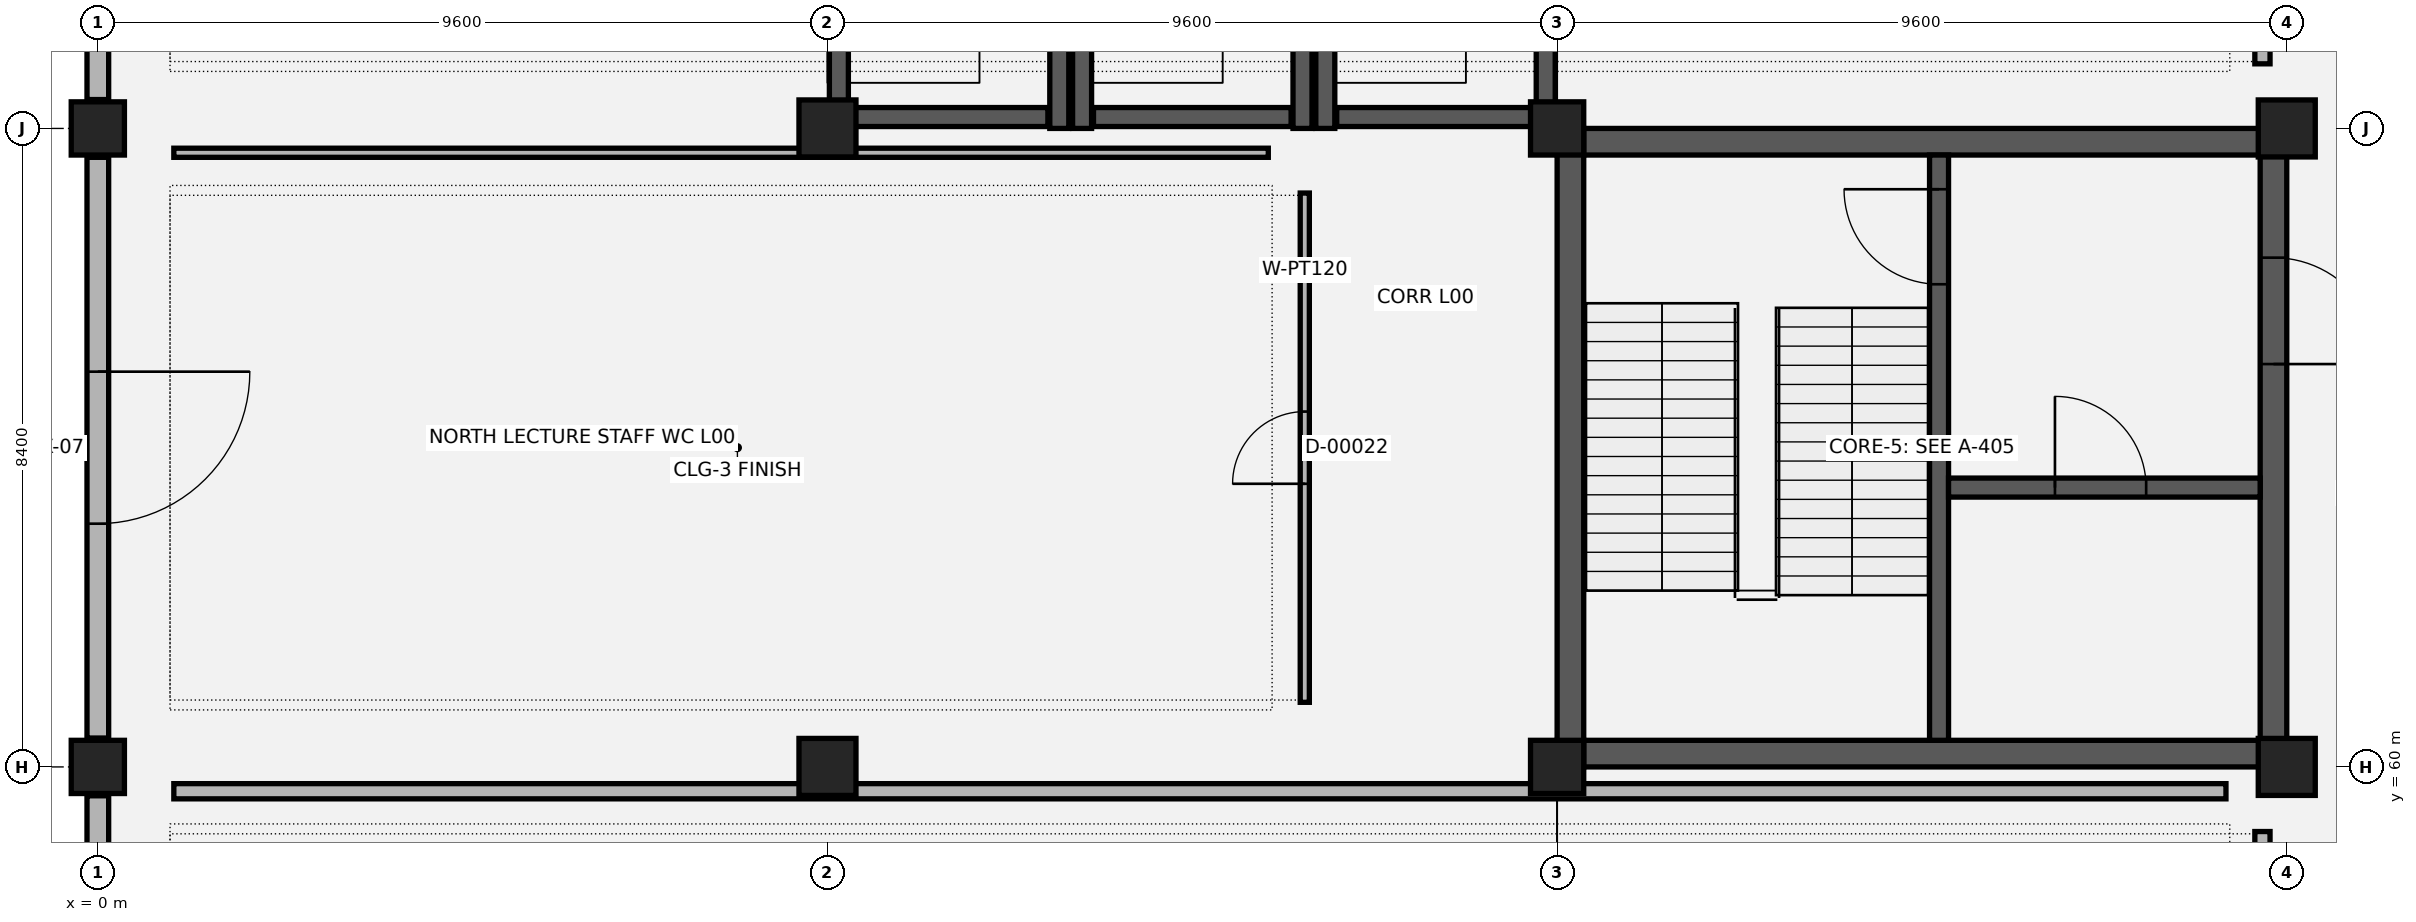
"""IFC4 building model, lengths in metres.
Left out: names, types, materials, properties, quantities, classifications, styles, units other than length and angle.
Written with IfcOpenShell. Run it as: python <this file> out.ifc"""

import sys

from ifc_helpers import new_model, si_unit, direction, frame, frame_2d, origin, origin_2d, place, context, subcontext, project, spatial, rectangle, extrude, element, fill, save


model = new_model("IFC4")
c1 = context("Model", 3, precision=1e-05, world=origin(), true_north=direction((0.0, 1.0)))
c2 = subcontext(c1, "Body", "Model", "MODEL_VIEW")
j1 = project(units=[si_unit("LENGTHUNIT", "METRE"), si_unit("PLANEANGLEUNIT", "RADIAN")], contexts=[c1])
p1 = place(None, origin())
s1 = spatial("IfcSite", under=j1, at=p1, CompositionType="ELEMENT")
p2 = place(p1, origin())
s2 = spatial("IfcBuilding", under=s1, at=p2, CompositionType="ELEMENT")
p3 = place(p2, origin())
s3 = spatial("IfcBuildingStorey", under=s2, at=p3, CompositionType="ELEMENT", Elevation=0.0)
for number, where, z_axis, x_axis in (
    (1, (0.0, 60.0, 0.0), (0.0, 0.0, 1.0), (1.0, 0.0, 0.0)),
    (2, (0.0, 68.4, 0.0), (0.0, 0.0, 1.0), (1.0, 0.0, 0.0)),
):
    element("IfcColumn", number, at=place(p3, frame(where, z_axis=z_axis, x_axis=x_axis)), inside=s3, PredefinedType="COLUMN", context=c2, shape_type="SweptSolid", body=[
        extrude(rectangle(XDim=0.7, YDim=0.7, at=origin_2d()), origin(), (0.0, 0.0, 1.0), 5.4),
    ])
for number, where, z_axis, x_axis in (
    (3, (9.6, 60.0, 0.0), (0.0, 0.0, 1.0), (1.0, 0.0, 0.0)),
    (4, (9.6, 68.4, 0.0), (0.0, 0.0, 1.0), (1.0, 0.0, 0.0)),
):
    element("IfcColumn", number, at=place(p3, frame(where, z_axis=z_axis, x_axis=x_axis)), inside=s3, PredefinedType="COLUMN", context=c2, shape_type="SweptSolid", body=[
        extrude(rectangle(XDim=0.75, YDim=0.75, at=origin_2d()), origin(), (0.0, 0.0, 1.0), 5.4),
    ])
for number, where, z_axis, x_axis in (
    (5, (19.2, 60.0, 0.0), (0.0, 0.0, 1.0), (1.0, 0.0, 0.0)),
    (6, (19.2, 68.4, 0.0), (0.0, 0.0, 1.0), (1.0, 0.0, 0.0)),
):
    element("IfcColumn", number, at=place(p3, frame(where, z_axis=z_axis, x_axis=x_axis)), inside=s3, PredefinedType="COLUMN", context=c2, shape_type="SweptSolid", body=[
        extrude(rectangle(XDim=0.7, YDim=0.7, at=origin_2d()), origin(), (0.0, 0.0, 1.0), 5.4),
    ])
for number, where, z_axis, x_axis in (
    (7, (28.8, 60.0, 0.0), (0.0, 0.0, 1.0), (1.0, 0.0, 0.0)),
    (8, (28.8, 68.4, 0.0), (0.0, 0.0, 1.0), (1.0, 0.0, 0.0)),
):
    element("IfcColumn", number, at=place(p3, frame(where, z_axis=z_axis, x_axis=x_axis)), inside=s3, PredefinedType="COLUMN", context=c2, shape_type="SweptSolid", body=[
        extrude(rectangle(XDim=0.75, YDim=0.75, at=origin_2d()), origin(), (0.0, 0.0, 1.0), 5.4),
    ])
for number, where, z_axis, x_axis in (
    (9, (9.75, 68.4, 0.0), (0.0, 0.0, 1.0), (0.0, 1.0, 0.0)),
    (10, (12.65, 68.4, 0.0), (0.0, 0.0, 1.0), (0.0, 1.0, 0.0)),
):
    element("IfcWall", number, at=place(p3, frame(where, z_axis=z_axis, x_axis=x_axis)), inside=s3, PredefinedType="SHEAR", context=c2, shape_type="SweptSolid", body=[
        extrude(rectangle(XDim=8.4, YDim=0.25, at=frame_2d((4.2, 0.0))), origin(), (0.0, 0.0, 1.0), 0.4),
    ])
p4 = place(p3, frame((9.9, 68.55, 0.0), z_axis=(0.0, 0.0, 1.0), x_axis=(1.0, 0.0, 0.0)))
e11 = element("IfcWall", 11, at=p4, inside=s3, PredefinedType="SHEAR", context=c2, shape_type="SweptSolid", body=[
    extrude(rectangle(XDim=2.6, YDim=0.25, at=frame_2d((1.3, 0.0))), origin(), (0.0, 0.0, 1.0), 0.4),
])
for number, where, z_axis, x_axis in (
    (12, (12.95, 68.4, 0.0), (0.0, 0.0, 1.0), (0.0, 1.0, 0.0)),
    (13, (15.85, 68.4, 0.0), (0.0, 0.0, 1.0), (0.0, 1.0, 0.0)),
):
    element("IfcWall", number, at=place(p3, frame(where, z_axis=z_axis, x_axis=x_axis)), inside=s3, PredefinedType="SHEAR", context=c2, shape_type="SweptSolid", body=[
        extrude(rectangle(XDim=8.4, YDim=0.25, at=frame_2d((4.2, 0.0))), origin(), (0.0, 0.0, 1.0), 1.0),
    ])
p5 = place(p3, frame((13.1, 68.55, 0.0), z_axis=(0.0, 0.0, 1.0), x_axis=(1.0, 0.0, 0.0)))
e14 = element("IfcWall", 14, at=p5, inside=s3, PredefinedType="SHEAR", context=c2, shape_type="SweptSolid", body=[
    extrude(rectangle(XDim=2.6, YDim=0.25, at=frame_2d((1.3, 0.0))), origin(), (0.0, 0.0, 1.0), 1.0),
])
for number, where, z_axis, x_axis in (
    (15, (16.15, 68.4, 0.0), (0.0, 0.0, 1.0), (0.0, 1.0, 0.0)),
    (16, (19.05, 68.4, 0.0), (0.0, 0.0, 1.0), (0.0, 1.0, 0.0)),
):
    element("IfcWall", number, at=place(p3, frame(where, z_axis=z_axis, x_axis=x_axis)), inside=s3, PredefinedType="SHEAR", context=c2, shape_type="SweptSolid", body=[
        extrude(rectangle(XDim=8.4, YDim=0.25, at=frame_2d((4.2, 0.0))), origin(), (0.0, 0.0, 1.0), 1.6),
    ])
p6 = place(p3, frame((16.3, 68.55, 0.0), z_axis=(0.0, 0.0, 1.0), x_axis=(1.0, 0.0, 0.0)))
e17 = element("IfcWall", 17, at=p6, inside=s3, PredefinedType="SHEAR", context=c2, shape_type="SweptSolid", body=[
    extrude(rectangle(XDim=2.6, YDim=0.25, at=frame_2d((1.3, 0.0))), origin(), (0.0, 0.0, 1.0), 1.6),
])
p7 = place(p3, frame((0.0, 59.62, 0.0), z_axis=(0.0, 0.0, 1.0), x_axis=(0.0, -1.0, 0.0)))
e18 = element("IfcWall", 18, at=p7, inside=s3, PredefinedType="SOLIDWALL", context=c2, shape_type="SweptSolid", body=[
    extrude(rectangle(XDim=7.64, YDim=0.285, at=frame_2d((3.82, 0.0))), origin(), (0.0, 0.0, 1.0), 4.04),
])
p8 = place(p7, frame((1.06, 0.0, 0.9)))
e19 = element("IfcOpeningElement", 19, at=p8, cuts=e18, PredefinedType="OPENING", context=c2, shape_type="SweptSolid", body=[
    extrude(rectangle(XDim=1.7, YDim=1.45, at=frame_2d((0.85, 0.725))), frame((0.0, 0.152, 0.0), z_axis=(0.0, -1.0, 0.0), x_axis=(1.0, 0.0, 0.0)), (0.0, 0.0, 1.0), 0.305),
])
p9 = place(p7, frame((5.005, 0.0, 0.9)))
e20 = element("IfcOpeningElement", 20, at=p9, cuts=e18, PredefinedType="OPENING", context=c2, shape_type="SweptSolid", body=[
    extrude(rectangle(XDim=1.45, YDim=1.45, at=frame_2d((0.725, 0.725))), frame((0.0, 0.152, 0.0), z_axis=(0.0, -1.0, 0.0), x_axis=(1.0, 0.0, 0.0)), (0.0, 0.0, 1.0), 0.305),
])
p10 = place(p3, frame((0.0, 68.02, 0.0), z_axis=(0.0, 0.0, 1.0), x_axis=(0.0, -1.0, 0.0)))
e21 = element("IfcWall", 21, at=p10, inside=s3, PredefinedType="SOLIDWALL", context=c2, shape_type="SweptSolid", body=[
    extrude(rectangle(XDim=7.64, YDim=0.285, at=frame_2d((3.82, 0.0))), origin(), (0.0, 0.0, 1.0), 4.04),
])
p11 = place(p10, frame((2.82, 0.0, 0.0)))
e22 = element("IfcOpeningElement", 22, at=p11, cuts=e21, PredefinedType="OPENING", context=c2, shape_type="SweptSolid", body=[
    extrude(rectangle(XDim=2.0, YDim=2.2, at=frame_2d((1.0, 1.1))), frame((0.0, 0.152, 0.0), z_axis=(0.0, -1.0, 0.0), x_axis=(1.0, 0.0, 0.0)), (0.0, 0.0, 1.0), 0.305),
])
p12 = place(p3, frame((0.0, 76.42, 0.0), z_axis=(0.0, 0.0, 1.0), x_axis=(0.0, -1.0, 0.0)))
e23 = element("IfcWall", 23, at=p12, inside=s3, PredefinedType="SOLIDWALL", context=c2, shape_type="SweptSolid", body=[
    extrude(rectangle(XDim=7.64, YDim=0.285, at=frame_2d((3.82, 0.0))), origin(), (0.0, 0.0, 1.0), 4.04),
])
p13 = place(p12, frame((1.26, 0.0, 0.9)))
e24 = element("IfcOpeningElement", 24, at=p13, cuts=e23, PredefinedType="OPENING", context=c2, shape_type="SweptSolid", body=[
    extrude(rectangle(XDim=1.3, YDim=1.4, at=frame_2d((0.65, 0.7))), frame((0.0, 0.152, 0.0), z_axis=(0.0, -1.0, 0.0), x_axis=(1.0, 0.0, 0.0)), (0.0, 0.0, 1.0), 0.305),
])
p14 = place(p12, frame((4.705, 0.0, 0.9)))
e25 = element("IfcOpeningElement", 25, at=p14, cuts=e23, PredefinedType="OPENING", context=c2, shape_type="SweptSolid", body=[
    extrude(rectangle(XDim=2.05, YDim=1.6, at=frame_2d((1.025, 0.8))), frame((0.0, 0.152, 0.0), z_axis=(0.0, -1.0, 0.0), x_axis=(1.0, 0.0, 0.0)), (0.0, 0.0, 1.0), 0.305),
])
for number, where, z_axis, x_axis in (
    (26, (19.2, 68.225, 0.0), (0.0, 0.0, 1.0), (1.0, 0.0, 0.0)),
    (27, (19.2, 60.175, 0.0), (0.0, 0.0, 1.0), (1.0, 0.0, 0.0)),
):
    element("IfcWall", number, at=place(p3, frame(where, z_axis=z_axis, x_axis=x_axis)), inside=s3, PredefinedType="SHEAR", context=c2, shape_type="SweptSolid", body=[
        extrude(rectangle(XDim=9.6, YDim=0.35, at=frame_2d((4.8, 0.0))), origin(), (0.0, 0.0, 1.0), 5.11),
    ])
p15 = place(p3, frame((19.375, 60.0, 0.0), z_axis=(0.0, 0.0, 1.0), x_axis=(0.0, 1.0, 0.0)))
e28 = element("IfcWall", 28, at=p15, inside=s3, PredefinedType="SHEAR", context=c2, shape_type="SweptSolid", body=[
    extrude(rectangle(XDim=8.4, YDim=0.35, at=frame_2d((4.2, 0.0))), origin(), (0.0, 0.0, 1.0), 5.11),
])
p16 = place(p3, frame((28.625, 60.0, 0.0), z_axis=(0.0, 0.0, 1.0), x_axis=(0.0, 1.0, 0.0)))
e29 = element("IfcWall", 29, at=p16, inside=s3, PredefinedType="SHEAR", context=c2, shape_type="SweptSolid", body=[
    extrude(rectangle(XDim=8.4, YDim=0.35, at=frame_2d((4.2, 0.0))), origin(), (0.0, 0.0, 1.0), 5.11),
])
p17 = place(p16, frame((5.3, 0.0, 0.0)))
e30 = element("IfcOpeningElement", 30, at=p17, cuts=e29, PredefinedType="OPENING", context=c2, shape_type="SweptSolid", body=[
    extrude(rectangle(XDim=1.4, YDim=2.15, at=frame_2d((0.7, 1.075))), frame((0.0, 0.185, 0.0), z_axis=(0.0, -1.0, 0.0), x_axis=(1.0, 0.0, 0.0)), (0.0, 0.0, 1.0), 0.37),
])
p18 = place(p3, frame((24.225, 68.05, 0.0), z_axis=(0.0, 0.0, 1.0), x_axis=(0.0, -1.0, 0.0)))
e31 = element("IfcWall", 31, at=p18, inside=s3, PredefinedType="SHEAR", context=c2, shape_type="SweptSolid", body=[
    extrude(rectangle(XDim=7.7, YDim=0.25, at=frame_2d((3.85, 0.0))), origin(), (0.0, 0.0, 1.0), 5.11),
])
p19 = place(p18, frame((0.45, 0.0, 0.0)))
e32 = element("IfcOpeningElement", 32, at=p19, cuts=e31, PredefinedType="OPENING", context=c2, shape_type="SweptSolid", body=[
    extrude(rectangle(XDim=1.25, YDim=2.15, at=frame_2d((0.625, 1.075))), frame((0.0, 0.135, 0.0), z_axis=(0.0, -1.0, 0.0), x_axis=(1.0, 0.0, 0.0)), (0.0, 0.0, 1.0), 0.27),
])
p20 = place(p3, frame((24.35, 63.675, 0.0), z_axis=(0.0, 0.0, 1.0), x_axis=(1.0, 0.0, 0.0)))
e33 = element("IfcWall", 33, at=p20, inside=s3, PredefinedType="SHEAR", context=c2, shape_type="SweptSolid", body=[
    extrude(rectangle(XDim=4.1, YDim=0.25, at=frame_2d((2.05, 0.0))), origin(), (0.0, 0.0, 1.0), 5.11),
])
p21 = place(p20, frame((1.4, 0.0, 0.0)))
e34 = element("IfcOpeningElement", 34, at=p21, cuts=e33, PredefinedType="OPENING", context=c2, shape_type="SweptSolid", body=[
    extrude(rectangle(XDim=1.2, YDim=2.15, at=frame_2d((0.6, 1.075))), frame((0.0, 0.135, 0.0), z_axis=(0.0, -1.0, 0.0), x_axis=(1.0, 0.0, 0.0)), (0.0, 0.0, 1.0), 0.27),
])
p22 = place(p3, frame((28.48, 33.25, 0.0), z_axis=(0.0, 0.0, 1.0), x_axis=(0.0, 1.0, 0.0)))
e35 = element("IfcWall", 35, at=p22, inside=s3, PredefinedType="PARTITIONING", context=c2, shape_type="SweptSolid", body=[
    extrude(rectangle(XDim=25.9, YDim=0.2, at=frame_2d((12.95, 0.0))), origin(), (0.0, 0.0, 1.0), 4.04),
])
p23 = place(p22, frame((14.53, 0.0, 0.0)))
e36 = element("IfcOpeningElement", 36, at=p23, cuts=e35, PredefinedType="OPENING", context=c2, shape_type="SweptSolid", body=[
    extrude(rectangle(XDim=1.55, YDim=2.15, at=frame_2d((0.775, 1.075))), frame((0.0, 0.11, 0.0), z_axis=(0.0, -1.0, 0.0), x_axis=(1.0, 0.0, 0.0)), (0.0, 0.0, 1.0), 0.22),
])
p24 = place(p3, frame((1.0, 59.68, 0.0), z_axis=(0.0, 0.0, 1.0), x_axis=(1.0, 0.0, 0.0)))
e37 = element("IfcWall", 37, at=p24, inside=s3, PredefinedType="PARTITIONING", context=c2, shape_type="SweptSolid", body=[
    extrude(rectangle(XDim=27.0, YDim=0.2, at=frame_2d((13.5, 0.0))), origin(), (0.0, 0.0, 1.0), 4.04),
])
p25 = place(p3, frame((28.48, 69.25, 0.0), z_axis=(0.0, 0.0, 1.0), x_axis=(0.0, 1.0, 0.0)))
e38 = element("IfcWall", 38, at=p25, inside=s3, PredefinedType="PARTITIONING", context=c2, shape_type="SweptSolid", body=[
    extrude(rectangle(XDim=11.3, YDim=0.2, at=frame_2d((5.65, 0.0))), origin(), (0.0, 0.0, 1.0), 4.04),
])
p26 = place(p25, frame((2.612, 0.0, 0.0)))
e39 = element("IfcOpeningElement", 39, at=p26, cuts=e38, PredefinedType="OPENING", context=c2, shape_type="SweptSolid", body=[
    extrude(rectangle(XDim=1.65, YDim=2.15, at=frame_2d((0.825, 1.075))), frame((0.0, 0.11, 0.0), z_axis=(0.0, -1.0, 0.0), x_axis=(1.0, 0.0, 0.0)), (0.0, 0.0, 1.0), 0.22),
])
p27 = place(p3, frame((15.88, 60.85, 0.0), z_axis=(0.0, 0.0, 1.0), x_axis=(0.0, 1.0, 0.0)))
e40 = element("IfcWall", 40, at=p27, inside=s3, PredefinedType="PARTITIONING", context=c2, shape_type="SweptSolid", body=[
    extrude(rectangle(XDim=6.7, YDim=0.12, at=frame_2d((3.35, 0.0))), origin(), (0.0, 0.0, 1.0), 4.04),
])
p28 = place(p27, frame((2.875, 0.0, 0.0)))
e41 = element("IfcOpeningElement", 41, at=p28, cuts=e40, PredefinedType="OPENING", context=c2, shape_type="SweptSolid", body=[
    extrude(rectangle(XDim=0.95, YDim=2.1, at=frame_2d((0.475, 1.05))), frame((0.0, 0.07, 0.0), z_axis=(0.0, -1.0, 0.0), x_axis=(1.0, 0.0, 0.0)), (0.0, 0.0, 1.0), 0.14),
])
p29 = place(p3, frame((1.0, 68.08, 0.0), z_axis=(0.0, 0.0, 1.0), x_axis=(1.0, 0.0, 0.0)))
e42 = element("IfcWall", 42, at=p29, inside=s3, PredefinedType="PARTITIONING", context=c2, shape_type="SweptSolid", body=[
    extrude(rectangle(XDim=14.4, YDim=0.12, at=frame_2d((7.2, 0.0))), origin(), (0.0, 0.0, 1.0), 4.04),
])
p30 = place(p11, origin())
e43 = element("IfcDoor", 43, at=p30, inside=s3, OperationType="SINGLE_SWING_LEFT", PredefinedType="DOOR", context=c2, shape_type="SweptSolid", body=[
    extrude(rectangle(XDim=2.0, YDim=2.2, at=frame_2d((1.0, 1.1))), frame((0.0, 0.025, 0.0), z_axis=(0.0, -1.0, 0.0), x_axis=(1.0, 0.0, 0.0)), (0.0, 0.0, 1.0), 0.05),
])
fill(e22, e43)
p31 = place(p19, origin())
e44 = element("IfcDoor", 44, at=p31, inside=s3, OperationType="SINGLE_SWING_RIGHT", PredefinedType="DOOR", context=c2, shape_type="SweptSolid", body=[
    extrude(rectangle(XDim=1.25, YDim=2.15, at=frame_2d((0.625, 1.075))), frame((0.0, 0.025, 0.0), z_axis=(0.0, -1.0, 0.0), x_axis=(1.0, 0.0, 0.0)), (0.0, 0.0, 1.0), 0.05),
])
fill(e32, e44)
p32 = place(p21, origin())
e45 = element("IfcDoor", 45, at=p32, inside=s3, OperationType="SINGLE_SWING_LEFT", PredefinedType="DOOR", context=c2, shape_type="SweptSolid", body=[
    extrude(rectangle(XDim=1.2, YDim=2.15, at=frame_2d((0.6, 1.075))), frame((0.0, 0.025, 0.0), z_axis=(0.0, -1.0, 0.0), x_axis=(1.0, 0.0, 0.0)), (0.0, 0.0, 1.0), 0.05),
])
fill(e34, e45)
p33 = place(p17, origin())
e46 = element("IfcDoor", 46, at=p33, inside=s3, OperationType="SINGLE_SWING_RIGHT", PredefinedType="DOOR", context=c2, shape_type="SweptSolid", body=[
    extrude(rectangle(XDim=1.4, YDim=2.15, at=frame_2d((0.7, 1.075))), frame((0.0, 0.025, 0.0), z_axis=(0.0, -1.0, 0.0), x_axis=(1.0, 0.0, 0.0)), (0.0, 0.0, 1.0), 0.05),
])
fill(e30, e46)
p34 = place(p28, origin())
e47 = element("IfcDoor", 47, at=p34, inside=s3, OperationType="SINGLE_SWING_LEFT", PredefinedType="DOOR", context=c2, shape_type="SweptSolid", body=[
    extrude(rectangle(XDim=0.95, YDim=2.1, at=frame_2d((0.475, 1.05))), frame((0.0, 0.025, 0.0), z_axis=(0.0, -1.0, 0.0), x_axis=(1.0, 0.0, 0.0)), (0.0, 0.0, 1.0), 0.05),
])
fill(e41, e47)
save(model, sys.argv[1])
